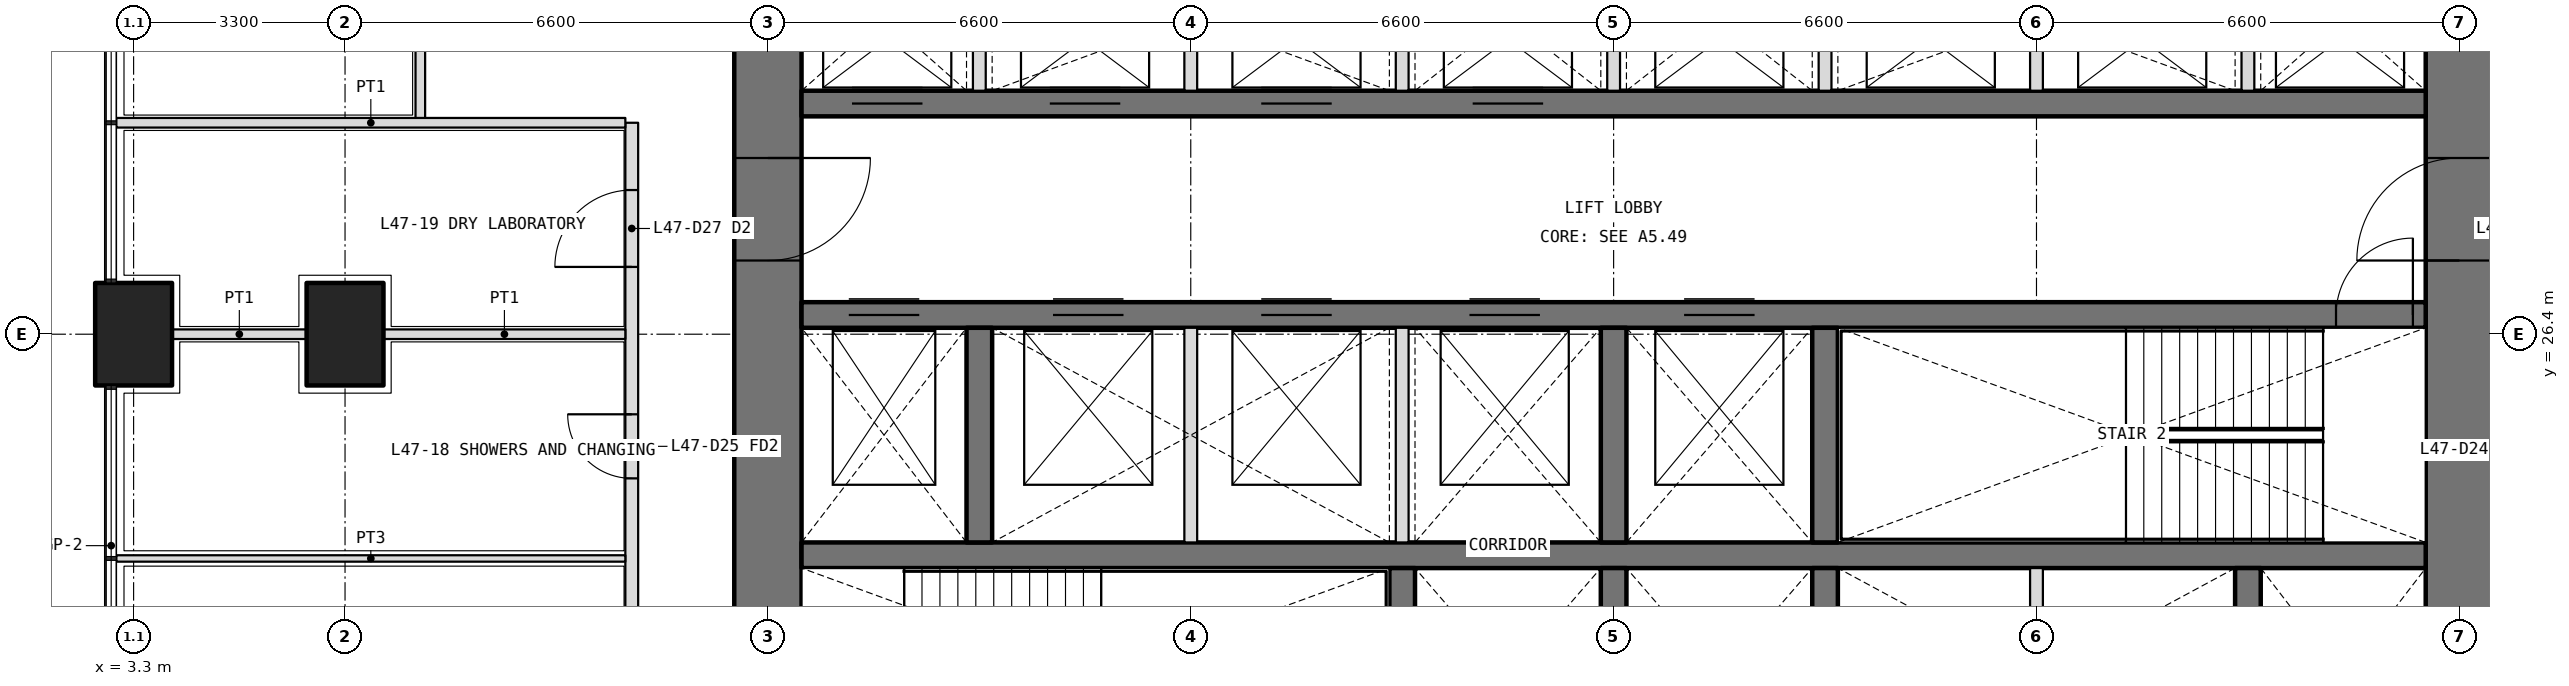
"""IFC4 building model, lengths in metres.
Left out: names, types, materials, properties, quantities, classifications, styles, units other than length and angle.
Written with IfcOpenShell. Run it as: python <this file> out.ifc"""

import sys

from ifc_helpers import new_model, si_unit, direction, frame, frame_2d, origin, origin_2d, place, context, subcontext, project, spatial, rectangle, extrude, element, fill, save


model = new_model("IFC4")
c1 = context("Model", 3, precision=1e-05, world=origin(), true_north=direction((0.0, 1.0)))
c2 = subcontext(c1, "Body", "Model", "MODEL_VIEW")
j1 = project(units=[si_unit("LENGTHUNIT", "METRE"), si_unit("PLANEANGLEUNIT", "RADIAN")], contexts=[c1])
p1 = place(None, origin())
s1 = spatial("IfcSite", under=j1, at=p1, CompositionType="ELEMENT")
p2 = place(p1, origin())
s2 = spatial("IfcBuilding", under=s1, at=p2, CompositionType="ELEMENT")
p3 = place(p2, frame((0.0, 0.0, 206.1)))
s3 = spatial("IfcBuildingStorey", under=s2, at=p3, CompositionType="ELEMENT", Elevation=206.1)
for number, where, z_axis, x_axis in (
    (1, (3.3, 26.4, 0.0), (0.0, 0.0, 1.0), (0.0, 1.0, 0.0)),
    (2, (6.6, 26.4, 0.0), (0.0, 0.0, 1.0), (0.0, 1.0, 0.0)),
):
    element("IfcColumn", number, at=place(p3, frame(where, z_axis=z_axis, x_axis=x_axis)), inside=s3, PredefinedType="COLUMN", context=c2, shape_type="SweptSolid", body=[
        extrude(rectangle(XDim=1.6, YDim=1.2, at=origin_2d()), origin(), (0.0, 0.0, 1.0), 4.2),
    ])
p4 = place(p3, frame((39.6, 13.725, 0.0), z_axis=(0.0, 0.0, 1.0), x_axis=(0.0, 1.0, 0.0)))
e3 = element("IfcWall", 3, at=p4, inside=s3, PredefinedType="SHEAR", context=c2, shape_type="SweptSolid", body=[
    extrude(rectangle(XDim=18.75, YDim=1.05, at=frame_2d((9.375, 0.0))), origin(), (0.0, 0.0, 1.0), 4.2),
])
p5 = place(p4, frame((3.025, 0.0, 0.0)))
e4 = element("IfcOpeningElement", 4, at=p5, cuts=e3, PredefinedType="OPENING", context=c2, shape_type="SweptSolid", body=[
    extrude(rectangle(XDim=1.6, YDim=2.1, at=frame_2d((0.8, 1.05))), frame((0.0, 0.535, 0.0), z_axis=(0.0, -1.0, 0.0), x_axis=(1.0, 0.0, 0.0)), (0.0, 0.0, 1.0), 1.07),
])
p6 = place(p4, frame((13.825, 0.0, 0.0)))
e5 = element("IfcOpeningElement", 5, at=p6, cuts=e3, PredefinedType="OPENING", context=c2, shape_type="SweptSolid", body=[
    extrude(rectangle(XDim=1.6, YDim=2.1, at=frame_2d((0.8, 1.05))), frame((0.0, 0.535, 0.0), z_axis=(0.0, -1.0, 0.0), x_axis=(1.0, 0.0, 0.0)), (0.0, 0.0, 1.0), 1.07),
])
p7 = place(p3, frame((13.2, 32.475, 0.0), z_axis=(0.0, 0.0, 1.0), x_axis=(0.0, -1.0, 0.0)))
e6 = element("IfcWall", 6, at=p7, inside=s3, PredefinedType="SHEAR", context=c2, shape_type="SweptSolid", body=[
    extrude(rectangle(XDim=18.75, YDim=1.05, at=frame_2d((9.375, 0.0))), origin(), (0.0, 0.0, 1.0), 4.2),
])
p8 = place(p7, frame((14.125, 0.0, 0.0)))
e7 = element("IfcOpeningElement", 7, at=p8, cuts=e6, PredefinedType="OPENING", context=c2, shape_type="SweptSolid", body=[
    extrude(rectangle(XDim=1.6, YDim=2.1, at=frame_2d((0.8, 1.05))), frame((0.0, 0.535, 0.0), z_axis=(0.0, -1.0, 0.0), x_axis=(1.0, 0.0, 0.0)), (0.0, 0.0, 1.0), 1.07),
])
p9 = place(p7, frame((3.325, 0.0, 0.0)))
e8 = element("IfcOpeningElement", 8, at=p9, cuts=e6, PredefinedType="OPENING", context=c2, shape_type="SweptSolid", body=[
    extrude(rectangle(XDim=1.6, YDim=2.1, at=frame_2d((0.8, 1.05))), frame((0.0, 0.535, 0.0), z_axis=(0.0, -1.0, 0.0), x_axis=(1.0, 0.0, 0.0)), (0.0, 0.0, 1.0), 1.07),
])
p10 = place(p3, frame((13.725, 22.95, 0.0), z_axis=(0.0, 0.0, 1.0), x_axis=(1.0, 0.0, 0.0)))
e9 = element("IfcWall", 9, at=p10, inside=s3, PredefinedType="SHEAR", context=c2, shape_type="SweptSolid", body=[
    extrude(rectangle(XDim=25.35, YDim=0.4, at=frame_2d((12.675, 0.0))), origin(), (0.0, 0.0, 1.0), 4.2),
])
p11 = place(p3, frame((13.725, 26.7, 0.0), z_axis=(0.0, 0.0, 1.0), x_axis=(1.0, 0.0, 0.0)))
e10 = element("IfcWall", 10, at=p11, inside=s3, PredefinedType="SHEAR", context=c2, shape_type="SweptSolid", body=[
    extrude(rectangle(XDim=25.35, YDim=0.4, at=frame_2d((12.675, 0.0))), origin(), (0.0, 0.0, 1.0), 4.2),
])
p12 = place(p11, frame((23.95, 0.0, 0.0)))
e11 = element("IfcOpeningElement", 11, at=p12, cuts=e10, PredefinedType="OPENING", context=c2, shape_type="SweptSolid", body=[
    extrude(rectangle(XDim=1.2, YDim=2.1, at=frame_2d((0.6, 1.05))), frame((0.0, 0.21, 0.0), z_axis=(0.0, -1.0, 0.0), x_axis=(1.0, 0.0, 0.0)), (0.0, 0.0, 1.0), 0.42),
])
p13 = place(p11, frame((0.738, 0.0, 0.0)))
e12 = element("IfcOpeningElement", 12, at=p13, cuts=e10, PredefinedType="OPENING", context=c2, shape_type="SweptSolid", body=[
    extrude(rectangle(XDim=1.1, YDim=2.1, at=frame_2d((0.55, 1.05))), frame((0.0, 0.21, 0.0), z_axis=(0.0, -1.0, 0.0), x_axis=(1.0, 0.0, 0.0)), (0.0, 0.0, 1.0), 0.42),
])
p14 = place(p11, frame((3.925, 0.0, 0.0)))
e13 = element("IfcOpeningElement", 13, at=p14, cuts=e10, PredefinedType="OPENING", context=c2, shape_type="SweptSolid", body=[
    extrude(rectangle(XDim=1.1, YDim=2.1, at=frame_2d((0.55, 1.05))), frame((0.0, 0.21, 0.0), z_axis=(0.0, -1.0, 0.0), x_axis=(1.0, 0.0, 0.0)), (0.0, 0.0, 1.0), 0.42),
])
p15 = place(p11, frame((7.175, 0.0, 0.0)))
e14 = element("IfcOpeningElement", 14, at=p15, cuts=e10, PredefinedType="OPENING", context=c2, shape_type="SweptSolid", body=[
    extrude(rectangle(XDim=1.1, YDim=2.1, at=frame_2d((0.55, 1.05))), frame((0.0, 0.21, 0.0), z_axis=(0.0, -1.0, 0.0), x_axis=(1.0, 0.0, 0.0)), (0.0, 0.0, 1.0), 0.42),
])
p16 = place(p11, frame((10.425, 0.0, 0.0)))
e15 = element("IfcOpeningElement", 15, at=p16, cuts=e10, PredefinedType="OPENING", context=c2, shape_type="SweptSolid", body=[
    extrude(rectangle(XDim=1.1, YDim=2.1, at=frame_2d((0.55, 1.05))), frame((0.0, 0.21, 0.0), z_axis=(0.0, -1.0, 0.0), x_axis=(1.0, 0.0, 0.0)), (0.0, 0.0, 1.0), 0.42),
])
p17 = place(p11, frame((13.775, 0.0, 0.0)))
e16 = element("IfcOpeningElement", 16, at=p17, cuts=e10, PredefinedType="OPENING", context=c2, shape_type="SweptSolid", body=[
    extrude(rectangle(XDim=1.1, YDim=2.1, at=frame_2d((0.55, 1.05))), frame((0.0, 0.21, 0.0), z_axis=(0.0, -1.0, 0.0), x_axis=(1.0, 0.0, 0.0)), (0.0, 0.0, 1.0), 0.42),
])
p18 = place(p3, frame((13.725, 30.0, 0.0), z_axis=(0.0, 0.0, 1.0), x_axis=(1.0, 0.0, 0.0)))
e17 = element("IfcWall", 17, at=p18, inside=s3, PredefinedType="SHEAR", context=c2, shape_type="SweptSolid", body=[
    extrude(rectangle(XDim=25.35, YDim=0.4, at=frame_2d((12.675, 0.0))), origin(), (0.0, 0.0, 1.0), 4.2),
])
p19 = place(p18, frame((0.788, 0.0, 0.0)))
e18 = element("IfcOpeningElement", 18, at=p19, cuts=e17, PredefinedType="OPENING", context=c2, shape_type="SweptSolid", body=[
    extrude(rectangle(XDim=1.1, YDim=2.1, at=frame_2d((0.55, 1.05))), frame((0.0, 0.21, 0.0), z_axis=(0.0, -1.0, 0.0), x_axis=(1.0, 0.0, 0.0)), (0.0, 0.0, 1.0), 0.42),
])
p20 = place(p18, frame((3.875, 0.0, 0.0)))
e19 = element("IfcOpeningElement", 19, at=p20, cuts=e17, PredefinedType="OPENING", context=c2, shape_type="SweptSolid", body=[
    extrude(rectangle(XDim=1.1, YDim=2.1, at=frame_2d((0.55, 1.05))), frame((0.0, 0.21, 0.0), z_axis=(0.0, -1.0, 0.0), x_axis=(1.0, 0.0, 0.0)), (0.0, 0.0, 1.0), 0.42),
])
p21 = place(p18, frame((7.175, 0.0, 0.0)))
e20 = element("IfcOpeningElement", 20, at=p21, cuts=e17, PredefinedType="OPENING", context=c2, shape_type="SweptSolid", body=[
    extrude(rectangle(XDim=1.1, YDim=2.1, at=frame_2d((0.55, 1.05))), frame((0.0, 0.21, 0.0), z_axis=(0.0, -1.0, 0.0), x_axis=(1.0, 0.0, 0.0)), (0.0, 0.0, 1.0), 0.42),
])
p22 = place(p18, frame((10.475, 0.0, 0.0)))
e21 = element("IfcOpeningElement", 21, at=p22, cuts=e17, PredefinedType="OPENING", context=c2, shape_type="SweptSolid", body=[
    extrude(rectangle(XDim=1.1, YDim=2.1, at=frame_2d((0.55, 1.05))), frame((0.0, 0.21, 0.0), z_axis=(0.0, -1.0, 0.0), x_axis=(1.0, 0.0, 0.0)), (0.0, 0.0, 1.0), 0.42),
])
for number, where, z_axis, x_axis in (
    (22, (23.1, 19.4, 0.0), (0.0, 0.0, 1.0), (0.0, 1.0, 0.0)),
    (23, (26.4, 19.4, 0.0), (0.0, 0.0, 1.0), (0.0, 1.0, 0.0)),
    (24, (29.7, 19.4, 0.0), (0.0, 0.0, 1.0), (0.0, 1.0, 0.0)),
    (25, (36.3, 19.4, 0.0), (0.0, 0.0, 1.0), (0.0, 1.0, 0.0)),
    (26, (16.5, 23.15, 0.0), (0.0, 0.0, 1.0), (0.0, 1.0, 0.0)),
    (27, (26.4, 23.15, 0.0), (0.0, 0.0, 1.0), (0.0, 1.0, 0.0)),
    (28, (29.7, 23.15, 0.0), (0.0, 0.0, 1.0), (0.0, 1.0, 0.0)),
):
    element("IfcWall", number, at=place(p3, frame(where, z_axis=z_axis, x_axis=x_axis)), inside=s3, PredefinedType="SHEAR", context=c2, shape_type="SweptSolid", body=[
        extrude(rectangle(XDim=3.35, YDim=0.4, at=frame_2d((1.675, 0.0))), origin(), (0.0, 0.0, 1.0), 4.2),
    ])
for number, where, z_axis, x_axis in (
    (29, (16.5, 30.2, 0.0), (0.0, 0.0, 1.0), (0.0, 1.0, 0.0)),
    (30, (19.8, 30.2, 0.0), (0.0, 0.0, 1.0), (0.0, 1.0, 0.0)),
    (31, (23.1, 30.2, 0.0), (0.0, 0.0, 1.0), (0.0, 1.0, 0.0)),
    (32, (26.4, 30.2, 0.0), (0.0, 0.0, 1.0), (0.0, 1.0, 0.0)),
    (33, (29.7, 30.2, 0.0), (0.0, 0.0, 1.0), (0.0, 1.0, 0.0)),
    (34, (33.0, 30.2, 0.0), (0.0, 0.0, 1.0), (0.0, 1.0, 0.0)),
    (35, (36.3, 30.2, 0.0), (0.0, 0.0, 1.0), (0.0, 1.0, 0.0)),
):
    element("IfcWall", number, at=place(p3, frame(where, z_axis=z_axis, x_axis=x_axis)), inside=s3, PredefinedType="PARTITIONING", context=c2, shape_type="SweptSolid", body=[
        extrude(rectangle(XDim=2.275, YDim=0.2, at=frame_2d((1.138, 0.0))), origin(), (0.0, 0.0, 1.0), 4.2),
    ])
for number, where, z_axis, x_axis in (
    (36, (33.0, 19.4, 0.0), (0.0, 0.0, 1.0), (0.0, 1.0, 0.0)),
    (37, (19.8, 23.15, 0.0), (0.0, 0.0, 1.0), (0.0, 1.0, 0.0)),
    (38, (23.1, 23.15, 0.0), (0.0, 0.0, 1.0), (0.0, 1.0, 0.0)),
):
    element("IfcWall", number, at=place(p3, frame(where, z_axis=z_axis, x_axis=x_axis)), inside=s3, PredefinedType="PARTITIONING", context=c2, shape_type="SweptSolid", body=[
        extrude(rectangle(XDim=3.35, YDim=0.2, at=frame_2d((1.675, 0.0))), origin(), (0.0, 0.0, 1.0), 4.2),
    ])
p23 = place(p3, frame((11.075, 11.175, 0.0), z_axis=(0.0, 0.0, 1.0), x_axis=(0.0, 1.0, 0.0)))
e39 = element("IfcWall", 39, at=p23, inside=s3, PredefinedType="PARTITIONING", context=c2, shape_type="SweptSolid", body=[
    extrude(rectangle(XDim=18.525, YDim=0.2, at=frame_2d((9.262, 0.0))), origin(), (0.0, 0.0, 1.0), 2.85),
])
p24 = place(p23, frame((0.363, 0.0, 0.0)))
e40 = element("IfcOpeningElement", 40, at=p24, cuts=e39, PredefinedType="OPENING", context=c2, shape_type="SweptSolid", body=[
    extrude(rectangle(XDim=1.2, YDim=2.1, at=frame_2d((0.6, 1.05))), frame((0.0, 0.11, 0.0), z_axis=(0.0, -1.0, 0.0), x_axis=(1.0, 0.0, 0.0)), (0.0, 0.0, 1.0), 0.22),
])
p25 = place(p23, frame((2.575, 0.0, 0.0)))
e41 = element("IfcOpeningElement", 41, at=p25, cuts=e39, PredefinedType="OPENING", context=c2, shape_type="SweptSolid", body=[
    extrude(rectangle(XDim=1.0, YDim=2.1, at=frame_2d((0.5, 1.05))), frame((0.0, 0.11, 0.0), z_axis=(0.0, -1.0, 0.0), x_axis=(1.0, 0.0, 0.0)), (0.0, 0.0, 1.0), 0.22),
])
p26 = place(p23, frame((5.625, 0.0, 0.0)))
e42 = element("IfcOpeningElement", 42, at=p26, cuts=e39, PredefinedType="OPENING", context=c2, shape_type="SweptSolid", body=[
    extrude(rectangle(XDim=0.9, YDim=2.1, at=frame_2d((0.45, 1.05))), frame((0.0, 0.11, 0.0), z_axis=(0.0, -1.0, 0.0), x_axis=(1.0, 0.0, 0.0)), (0.0, 0.0, 1.0), 0.22),
])
p27 = place(p23, frame((9.425, 0.0, 0.0)))
e43 = element("IfcOpeningElement", 43, at=p27, cuts=e39, PredefinedType="OPENING", context=c2, shape_type="SweptSolid", body=[
    extrude(rectangle(XDim=0.9, YDim=2.1, at=frame_2d((0.45, 1.05))), frame((0.0, 0.11, 0.0), z_axis=(0.0, -1.0, 0.0), x_axis=(1.0, 0.0, 0.0)), (0.0, 0.0, 1.0), 0.22),
])
p28 = place(p23, frame((12.975, 0.0, 0.0)))
e44 = element("IfcOpeningElement", 44, at=p28, cuts=e39, PredefinedType="OPENING", context=c2, shape_type="SweptSolid", body=[
    extrude(rectangle(XDim=1.0, YDim=2.1, at=frame_2d((0.5, 1.05))), frame((0.0, 0.11, 0.0), z_axis=(0.0, -1.0, 0.0), x_axis=(1.0, 0.0, 0.0)), (0.0, 0.0, 1.0), 0.22),
])
p29 = place(p23, frame((16.275, 0.0, 0.0)))
e45 = element("IfcOpeningElement", 45, at=p29, cuts=e39, PredefinedType="OPENING", context=c2, shape_type="SweptSolid", body=[
    extrude(rectangle(XDim=1.2, YDim=2.1, at=frame_2d((0.6, 1.05))), frame((0.0, 0.11, 0.0), z_axis=(0.0, -1.0, 0.0), x_axis=(1.0, 0.0, 0.0)), (0.0, 0.0, 1.0), 0.22),
])
p30 = place(p3, frame((3.03, 22.9, 0.0), z_axis=(0.0, 0.0, 1.0), x_axis=(1.0, 0.0, 0.0)))
e46 = element("IfcWall", 46, at=p30, inside=s3, PredefinedType="PARTITIONING", context=c2, shape_type="SweptSolid", body=[
    extrude(rectangle(XDim=7.945, YDim=0.1, at=frame_2d((3.973, 0.0))), origin(), (0.0, 0.0, 1.0), 2.7),
])
p31 = place(p3, frame((7.775, 29.7, 0.0), z_axis=(0.0, 0.0, 1.0), x_axis=(0.0, 1.0, 0.0)))
e47 = element("IfcWall", 47, at=p31, inside=s3, PredefinedType="PARTITIONING", context=c2, shape_type="SweptSolid", body=[
    extrude(rectangle(XDim=3.3, YDim=0.15, at=frame_2d((1.65, 0.0))), origin(), (0.0, 0.0, 1.0), 2.85),
])
p32 = place(p31, frame((1.15, 0.0, 0.0)))
e48 = element("IfcOpeningElement", 48, at=p32, cuts=e47, PredefinedType="OPENING", context=c2, shape_type="SweptSolid", body=[
    extrude(rectangle(XDim=1.0, YDim=2.1, at=frame_2d((0.5, 1.05))), frame((0.0, 0.085, 0.0), z_axis=(0.0, -1.0, 0.0), x_axis=(1.0, 0.0, 0.0)), (0.0, 0.0, 1.0), 0.17),
])
p33 = place(p3, frame((3.9, 26.4, 0.0), z_axis=(0.0, 0.0, 1.0), x_axis=(1.0, 0.0, 0.0)))
e49 = element("IfcWall", 49, at=p33, inside=s3, PredefinedType="PARTITIONING", context=c2, shape_type="SweptSolid", body=[
    extrude(rectangle(XDim=2.1, YDim=0.15, at=frame_2d((1.05, 0.0))), origin(), (0.0, 0.0, 1.0), 2.85),
])
p34 = place(p3, frame((7.2, 26.4, 0.0), z_axis=(0.0, 0.0, 1.0), x_axis=(1.0, 0.0, 0.0)))
e50 = element("IfcWall", 50, at=p34, inside=s3, PredefinedType="PARTITIONING", context=c2, shape_type="SweptSolid", body=[
    extrude(rectangle(XDim=3.775, YDim=0.15, at=frame_2d((1.888, 0.0))), origin(), (0.0, 0.0, 1.0), 2.85),
])
p35 = place(p3, frame((3.03, 29.7, 0.0), z_axis=(0.0, 0.0, 1.0), x_axis=(1.0, 0.0, 0.0)))
e51 = element("IfcWall", 51, at=p35, inside=s3, PredefinedType="PARTITIONING", context=c2, shape_type="SweptSolid", body=[
    extrude(rectangle(XDim=7.945, YDim=0.15, at=frame_2d((3.973, 0.0))), origin(), (0.0, 0.0, 1.0), 2.7),
])
p36 = place(p28, origin())
e52 = element("IfcDoor", 52, at=p36, inside=s3, OperationType="SINGLE_SWING_RIGHT", PredefinedType="DOOR", context=c2, shape_type="SweptSolid", body=[
    extrude(rectangle(XDim=1.0, YDim=2.1, at=frame_2d((0.5, 1.05))), frame((0.0, 0.025, 0.0), z_axis=(0.0, -1.0, 0.0), x_axis=(1.0, 0.0, 0.0)), (0.0, 0.0, 1.0), 0.05),
])
fill(e44, e52)
p37 = place(p29, origin())
e53 = element("IfcDoor", 53, at=p37, inside=s3, OperationType="DOUBLE_DOOR_SINGLE_SWING", PredefinedType="DOOR", context=c2, shape_type="SweptSolid", body=[
    extrude(rectangle(XDim=1.2, YDim=2.1, at=frame_2d((0.6, 1.05))), frame((0.0, 0.025, 0.0), z_axis=(0.0, -1.0, 0.0), x_axis=(1.0, 0.0, 0.0)), (0.0, 0.0, 1.0), 0.05),
])
fill(e45, e53)
p38 = place(p12, origin())
e54 = element("IfcDoor", 54, at=p38, inside=s3, OperationType="SINGLE_SWING_RIGHT", PredefinedType="DOOR", context=c2, shape_type="SweptSolid", body=[
    extrude(rectangle(XDim=1.2, YDim=2.1, at=frame_2d((0.6, 1.05))), frame((0.0, 0.025, 0.0), z_axis=(0.0, -1.0, 0.0), x_axis=(1.0, 0.0, 0.0)), (0.0, 0.0, 1.0), 0.05),
])
fill(e11, e54)
p39 = place(p9, origin())
e55 = element("IfcDoor", 55, at=p39, inside=s3, OperationType="DOUBLE_DOOR_DOUBLE_SWING", PredefinedType="DOOR", context=c2, shape_type="SweptSolid", body=[
    extrude(rectangle(XDim=1.6, YDim=2.1, at=frame_2d((0.8, 1.05))), frame((0.0, 0.025, 0.0), z_axis=(0.0, -1.0, 0.0), x_axis=(1.0, 0.0, 0.0)), (0.0, 0.0, 1.0), 0.05),
])
fill(e8, e55)
p40 = place(p6, origin())
e56 = element("IfcDoor", 56, at=p40, inside=s3, OperationType="DOUBLE_DOOR_DOUBLE_SWING", PredefinedType="DOOR", context=c2, shape_type="SweptSolid", body=[
    extrude(rectangle(XDim=1.6, YDim=2.1, at=frame_2d((0.8, 1.05))), frame((0.0, 0.025, 0.0), z_axis=(0.0, -1.0, 0.0), x_axis=(1.0, 0.0, 0.0)), (0.0, 0.0, 1.0), 0.05),
])
fill(e5, e56)
p41 = place(p19, origin())
e57 = element("IfcDoor", 57, at=p41, inside=s3, OperationType="DOUBLE_DOOR_SLIDING", PredefinedType="DOOR", context=c2, shape_type="SweptSolid", body=[
    extrude(rectangle(XDim=1.1, YDim=2.1, at=frame_2d((0.55, 1.05))), frame((0.0, 0.025, 0.0), z_axis=(0.0, -1.0, 0.0), x_axis=(1.0, 0.0, 0.0)), (0.0, 0.0, 1.0), 0.05),
])
fill(e18, e57)
p42 = place(p20, origin())
e58 = element("IfcDoor", 58, at=p42, inside=s3, OperationType="DOUBLE_DOOR_SLIDING", PredefinedType="DOOR", context=c2, shape_type="SweptSolid", body=[
    extrude(rectangle(XDim=1.1, YDim=2.1, at=frame_2d((0.55, 1.05))), frame((0.0, 0.025, 0.0), z_axis=(0.0, -1.0, 0.0), x_axis=(1.0, 0.0, 0.0)), (0.0, 0.0, 1.0), 0.05),
])
fill(e19, e58)
p43 = place(p21, origin())
e59 = element("IfcDoor", 59, at=p43, inside=s3, OperationType="DOUBLE_DOOR_SLIDING", PredefinedType="DOOR", context=c2, shape_type="SweptSolid", body=[
    extrude(rectangle(XDim=1.1, YDim=2.1, at=frame_2d((0.55, 1.05))), frame((0.0, 0.025, 0.0), z_axis=(0.0, -1.0, 0.0), x_axis=(1.0, 0.0, 0.0)), (0.0, 0.0, 1.0), 0.05),
])
fill(e20, e59)
p44 = place(p22, origin())
e60 = element("IfcDoor", 60, at=p44, inside=s3, OperationType="DOUBLE_DOOR_SLIDING", PredefinedType="DOOR", context=c2, shape_type="SweptSolid", body=[
    extrude(rectangle(XDim=1.1, YDim=2.1, at=frame_2d((0.55, 1.05))), frame((0.0, 0.025, 0.0), z_axis=(0.0, -1.0, 0.0), x_axis=(1.0, 0.0, 0.0)), (0.0, 0.0, 1.0), 0.05),
])
fill(e21, e60)
p45 = place(p13, origin())
e61 = element("IfcDoor", 61, at=p45, inside=s3, OperationType="DOUBLE_DOOR_SLIDING", PredefinedType="DOOR", context=c2, shape_type="SweptSolid", body=[
    extrude(rectangle(XDim=1.1, YDim=2.1, at=frame_2d((0.55, 1.05))), frame((0.0, 0.025, 0.0), z_axis=(0.0, -1.0, 0.0), x_axis=(1.0, 0.0, 0.0)), (0.0, 0.0, 1.0), 0.05),
])
fill(e12, e61)
p46 = place(p14, origin())
e62 = element("IfcDoor", 62, at=p46, inside=s3, OperationType="DOUBLE_DOOR_SLIDING", PredefinedType="DOOR", context=c2, shape_type="SweptSolid", body=[
    extrude(rectangle(XDim=1.1, YDim=2.1, at=frame_2d((0.55, 1.05))), frame((0.0, 0.025, 0.0), z_axis=(0.0, -1.0, 0.0), x_axis=(1.0, 0.0, 0.0)), (0.0, 0.0, 1.0), 0.05),
])
fill(e13, e62)
p47 = place(p15, origin())
e63 = element("IfcDoor", 63, at=p47, inside=s3, OperationType="DOUBLE_DOOR_SLIDING", PredefinedType="DOOR", context=c2, shape_type="SweptSolid", body=[
    extrude(rectangle(XDim=1.1, YDim=2.1, at=frame_2d((0.55, 1.05))), frame((0.0, 0.025, 0.0), z_axis=(0.0, -1.0, 0.0), x_axis=(1.0, 0.0, 0.0)), (0.0, 0.0, 1.0), 0.05),
])
fill(e14, e63)
p48 = place(p16, origin())
e64 = element("IfcDoor", 64, at=p48, inside=s3, OperationType="DOUBLE_DOOR_SLIDING", PredefinedType="DOOR", context=c2, shape_type="SweptSolid", body=[
    extrude(rectangle(XDim=1.1, YDim=2.1, at=frame_2d((0.55, 1.05))), frame((0.0, 0.025, 0.0), z_axis=(0.0, -1.0, 0.0), x_axis=(1.0, 0.0, 0.0)), (0.0, 0.0, 1.0), 0.05),
])
fill(e15, e64)
p49 = place(p17, origin())
e65 = element("IfcDoor", 65, at=p49, inside=s3, OperationType="DOUBLE_DOOR_SLIDING", PredefinedType="DOOR", context=c2, shape_type="SweptSolid", body=[
    extrude(rectangle(XDim=1.1, YDim=2.1, at=frame_2d((0.55, 1.05))), frame((0.0, 0.025, 0.0), z_axis=(0.0, -1.0, 0.0), x_axis=(1.0, 0.0, 0.0)), (0.0, 0.0, 1.0), 0.05),
])
fill(e16, e65)
save(model, sys.argv[1])
